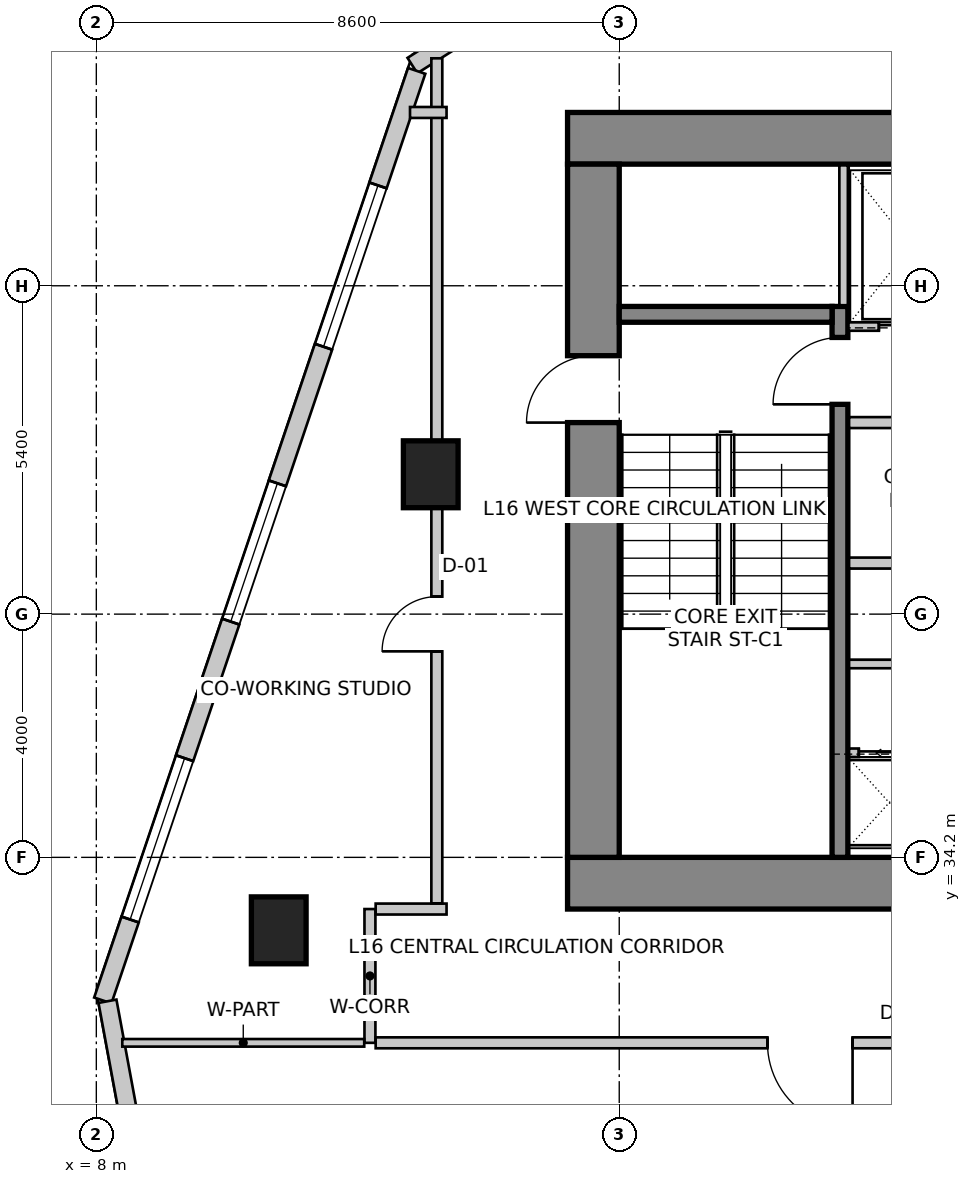
"""IFC4 building model, lengths in metres.
Left out: names, types, materials, properties, quantities, classifications, styles, units other than length and angle.
Written with IfcOpenShell. Run it as: python <this file> out.ifc"""

import sys

from ifc_helpers import new_model, si_unit, direction, frame, frame_2d, origin, origin_2d, place, context, subcontext, project, spatial, rectangle, extrude, source, transform, mapped, element, fill, save


model = new_model("IFC4")
c1 = context("Model", 3, precision=1e-05, world=origin(), true_north=direction((0.0, 1.0)))
c2 = subcontext(c1, "Body", "Model", "MODEL_VIEW")
j1 = project(units=[si_unit("LENGTHUNIT", "METRE"), si_unit("PLANEANGLEUNIT", "RADIAN")], contexts=[c1])
p1 = place(None, origin())
s1 = spatial("IfcSite", under=j1, at=p1, CompositionType="ELEMENT")
p2 = place(p1, origin())
s2 = spatial("IfcBuilding", under=s1, at=p2, CompositionType="ELEMENT")
p3 = place(p2, frame((0.0, 0.0, 67.0)))
s3 = spatial("IfcBuildingStorey", under=s2, at=p3, CompositionType="ELEMENT", Elevation=67.0)
p4 = place(p3, frame((15.75, 46.025, 0.0), z_axis=(0.0, 0.0, 1.0), x_axis=(1.0, 0.0, 0.0)))
e1 = element("IfcWall", 1, at=p4, inside=s3, PredefinedType="SHEAR", context=c2, shape_type="SweptSolid", body=[
    extrude(rectangle(XDim=16.1, YDim=0.85, at=frame_2d((8.05, 0.0))), origin(), (0.0, 0.0, 1.0), 4.0),
])
p5 = place(p3, frame((15.75, 33.775, 0.0), z_axis=(0.0, 0.0, 1.0), x_axis=(1.0, 0.0, 0.0)))
e2 = element("IfcWall", 2, at=p5, inside=s3, PredefinedType="SHEAR", context=c2, shape_type="SweptSolid", body=[
    extrude(rectangle(XDim=16.1, YDim=0.85, at=frame_2d((8.05, 0.0))), origin(), (0.0, 0.0, 1.0), 4.0),
])
m1 = source(origin(), c2, "Body", "SweptSolid", [
    extrude(rectangle(XDim=1.3, YDim=2.15, at=frame_2d((0.65, 1.075))), frame((0.0, 0.435, 0.0), z_axis=(0.0, -1.0, 0.0), x_axis=(1.0, 0.0, 0.0)), (0.0, 0.0, 1.0), 0.87),
])
p6 = place(p5, frame((10.18, 0.0, 0.0)))
e3 = element("IfcOpeningElement", 3, at=p6, cuts=e2, PredefinedType="OPENING", context=c2, shape_type="MappedRepresentation", body=[
    mapped(m1, transform((0.0, 0.0, 0.0), scale=1.0)),
])
p7 = place(p3, frame((16.175, 34.2, 0.0), z_axis=(0.0, 0.0, 1.0), x_axis=(0.0, 1.0, 0.0)))
e4 = element("IfcWall", 4, at=p7, inside=s3, PredefinedType="SHEAR", context=c2, shape_type="SweptSolid", body=[
    extrude(rectangle(XDim=11.4, YDim=0.85, at=frame_2d((5.7, 0.0))), origin(), (0.0, 0.0, 1.0), 4.0),
])
m2 = source(origin(), c2, "Body", "SweptSolid", [
    extrude(rectangle(XDim=1.1, YDim=2.15, at=frame_2d((0.55, 1.075))), frame((0.0, 0.435, 0.0), z_axis=(0.0, -1.0, 0.0), x_axis=(1.0, 0.0, 0.0)), (0.0, 0.0, 1.0), 0.87),
])
p8 = place(p7, frame((7.15, 0.0, 0.0)))
e5 = element("IfcOpeningElement", 5, at=p8, cuts=e4, PredefinedType="OPENING", context=c2, shape_type="MappedRepresentation", body=[
    mapped(m2, transform((0.0, 0.0, 0.0), scale=1.0)),
])
p9 = place(p3, frame((20.23, 34.2, 0.0), z_axis=(0.0, 0.0, 1.0), x_axis=(0.0, 1.0, 0.0)))
e6 = element("IfcWall", 6, at=p9, inside=s3, PredefinedType="SHEAR", context=c2, shape_type="SweptSolid", body=[
    extrude(rectangle(XDim=9.06, YDim=0.26, at=frame_2d((4.53, 0.0))), origin(), (0.0, 0.0, 1.0), 4.0),
])
m3 = source(origin(), c2, "Body", "SweptSolid", [
    extrude(rectangle(XDim=1.1, YDim=2.15, at=frame_2d((0.55, 1.075))), frame((0.0, 0.14, 0.0), z_axis=(0.0, -1.0, 0.0), x_axis=(1.0, 0.0, 0.0)), (0.0, 0.0, 1.0), 0.28),
])
p10 = place(p9, frame((7.45, 0.0, 0.0)))
e7 = element("IfcOpeningElement", 7, at=p10, cuts=e6, PredefinedType="OPENING", context=c2, shape_type="MappedRepresentation", body=[
    mapped(m3, transform((0.0, 0.0, 0.0), scale=1.0)),
])
p11 = place(p3, frame((16.6, 43.13, 0.0), z_axis=(0.0, 0.0, 1.0), x_axis=(1.0, 0.0, 0.0)))
e8 = element("IfcWall", 8, at=p11, inside=s3, PredefinedType="SHEAR", context=c2, shape_type="SweptSolid", body=[
    extrude(rectangle(XDim=3.5, YDim=0.26, at=frame_2d((1.75, 0.0))), origin(), (0.0, 0.0, 1.0), 4.0),
])
m4 = source(origin(), c2, "Body", "SweptSolid", [
    extrude(rectangle(XDim=0.9, YDim=1.1, at=origin_2d()), origin(), (0.0, 0.0, 1.0), 4.0),
])
for number, where, z_axis, x_axis in (
    (9, (11.0, 33.0, 0.0), (0.0, 0.0, 1.0), (1.0, 0.0, 0.0)),
    (10, (13.5, 40.5, 0.0), (0.0, 0.0, 1.0), (1.0, 0.0, 0.0)),
):
    element("IfcColumn", number, at=place(p3, frame(where, z_axis=z_axis, x_axis=x_axis)), inside=s3, PredefinedType="COLUMN", context=c2, shape_type="MappedRepresentation", body=[
        mapped(m4, transform((0.0, 0.0, 0.0), scale=1.0)),
    ])
p12 = place(p3, frame((21.875, 52.742, 0.0), z_axis=(0.0, 0.0, 1.0), x_axis=(-0.843662465249, -0.536873956092, 0.0)))
e11 = element("IfcWall", 11, at=p12, inside=s3, PredefinedType="SOLIDWALL", context=c2, shape_type="SweptSolid", body=[
    extrude(rectangle(XDim=10.284, YDim=0.3, at=frame_2d((5.142, 0.0))), origin(), (0.0, 0.0, 1.0), 3.75),
])
m5 = source(origin(), c2, "Body", "SweptSolid", [
    extrude(rectangle(XDim=0.9, YDim=1.6, at=frame_2d((0.45, 0.8))), frame((0.0, 0.16, 0.0), z_axis=(0.0, -1.0, 0.0), x_axis=(1.0, 0.0, 0.0)), (0.0, 0.0, 1.0), 0.32),
])
p13 = place(p12, frame((0.629, 0.0, 0.85)))
e12 = element("IfcOpeningElement", 12, at=p13, cuts=e11, PredefinedType="OPENING", context=c2, shape_type="MappedRepresentation", body=[
    mapped(m5, transform((0.0, 0.0, 0.0), scale=1.0)),
])
m6 = source(origin(), c2, "Body", "SweptSolid", [
    extrude(rectangle(XDim=2.4, YDim=2.2, at=frame_2d((1.2, 1.1))), frame((0.0, 0.16, 0.0), z_axis=(0.0, -1.0, 0.0), x_axis=(1.0, 0.0, 0.0)), (0.0, 0.0, 1.0), 0.32),
])
p14 = place(p12, frame((3.542, 0.0, 0.85)))
e13 = element("IfcOpeningElement", 13, at=p14, cuts=e11, PredefinedType="OPENING", context=c2, shape_type="MappedRepresentation", body=[
    mapped(m6, transform((0.0, 0.0, 0.0), scale=1.0)),
])
m7 = source(origin(), c2, "Body", "SweptSolid", [
    extrude(rectangle(XDim=1.5, YDim=1.8, at=frame_2d((0.75, 0.9))), frame((0.0, 0.16, 0.0), z_axis=(0.0, -1.0, 0.0), x_axis=(1.0, 0.0, 0.0)), (0.0, 0.0, 1.0), 0.32),
])
p15 = place(p12, frame((7.903, 0.0, 0.85)))
e14 = element("IfcOpeningElement", 14, at=p15, cuts=e11, PredefinedType="OPENING", context=c2, shape_type="MappedRepresentation", body=[
    mapped(m7, transform((0.0, 0.0, 0.0), scale=1.0)),
])
p16 = place(p3, frame((13.269, 47.134, 0.0), z_axis=(0.0, 0.0, 1.0), x_axis=(-0.319920423265, -0.947444416722, 0.0)))
e15 = element("IfcWall", 15, at=p16, inside=s3, PredefinedType="SOLIDWALL", context=c2, shape_type="SweptSolid", body=[
    extrude(rectangle(XDim=16.135, YDim=0.3, at=frame_2d((8.067, 0.0))), origin(), (0.0, 0.0, 1.0), 3.75),
])
m8 = source(origin(), c2, "Body", "SweptSolid", [
    extrude(rectangle(XDim=2.8, YDim=2.4, at=frame_2d((1.4, 1.2))), frame((0.0, 0.16, 0.0), z_axis=(0.0, -1.0, 0.0), x_axis=(1.0, 0.0, 0.0)), (0.0, 0.0, 1.0), 0.32),
])
p17 = place(p16, frame((1.988, 0.0, 0.85)))
e16 = element("IfcOpeningElement", 16, at=p17, cuts=e15, PredefinedType="OPENING", context=c2, shape_type="MappedRepresentation", body=[
    mapped(m8, transform((0.0, 0.0, 0.0), scale=1.0)),
])
p18 = place(p16, frame((7.159, 0.0, 0.85)))
e17 = element("IfcOpeningElement", 17, at=p18, cuts=e15, PredefinedType="OPENING", context=c2, shape_type="MappedRepresentation", body=[
    mapped(m6, transform((0.0, 0.0, 0.0), scale=1.0)),
])
p19 = place(p16, frame((11.93, 0.0, 0.85)))
e18 = element("IfcOpeningElement", 18, at=p19, cuts=e15, PredefinedType="OPENING", context=c2, shape_type="MappedRepresentation", body=[
    mapped(m8, transform((0.0, 0.0, 0.0), scale=1.0)),
])
p20 = place(p3, frame((8.183, 31.833, 0.0), z_axis=(0.0, 0.0, 1.0), x_axis=(0.18216364648, -0.983268226834, 0.0)))
e19 = element("IfcWall", 19, at=p20, inside=s3, PredefinedType="SOLIDWALL", context=c2, shape_type="SweptSolid", body=[
    extrude(rectangle(XDim=26.678, YDim=0.3, at=frame_2d((13.339, 0.0))), origin(), (0.0, 0.0, 1.0), 3.75),
])
m9 = source(origin(), c2, "Body", "SweptSolid", [
    extrude(rectangle(XDim=1.6, YDim=2.15, at=frame_2d((0.8, 1.075))), frame((0.0, 0.16, 0.0), z_axis=(0.0, -1.0, 0.0), x_axis=(1.0, 0.0, 0.0)), (0.0, 0.0, 1.0), 0.32),
])
p21 = place(p20, frame((9.427, 0.0, 0.0)))
e20 = element("IfcOpeningElement", 20, at=p21, cuts=e19, PredefinedType="OPENING", context=c2, shape_type="MappedRepresentation", body=[
    mapped(m9, transform((0.0, 0.0, 0.0), scale=1.0)),
])
p22 = place(p20, frame((3.842, 0.0, 0.85)))
e21 = element("IfcOpeningElement", 21, at=p22, cuts=e19, PredefinedType="OPENING", context=c2, shape_type="MappedRepresentation", body=[
    mapped(m6, transform((0.0, 0.0, 0.0), scale=1.0)),
])
p23 = place(p20, frame((13.847, 0.0, 0.85)))
e22 = element("IfcOpeningElement", 22, at=p23, cuts=e19, PredefinedType="OPENING", context=c2, shape_type="MappedRepresentation", body=[
    mapped(m6, transform((0.0, 0.0, 0.0), scale=1.0)),
])
p24 = place(p20, frame((18.172, 0.0, 0.85)))
e23 = element("IfcOpeningElement", 23, at=p24, cuts=e19, PredefinedType="OPENING", context=c2, shape_type="MappedRepresentation", body=[
    mapped(m8, transform((0.0, 0.0, 0.0), scale=1.0)),
])
p25 = place(p20, frame((22.896, 0.0, 0.85)))
e24 = element("IfcOpeningElement", 24, at=p25, cuts=e19, PredefinedType="OPENING", context=c2, shape_type="MappedRepresentation", body=[
    mapped(m6, transform((0.0, 0.0, 0.0), scale=1.0)),
])
p26 = place(p3, frame((20.37, 42.93, 0.0), z_axis=(0.0, 0.0, 1.0), x_axis=(1.0, 0.0, 0.0)))
e25 = element("IfcWall", 25, at=p26, inside=s3, PredefinedType="SOLIDWALL", context=c2, shape_type="SweptSolid", body=[
    extrude(rectangle(XDim=6.86, YDim=0.14, at=frame_2d((3.43, 0.0))), origin(), (0.0, 0.0, 1.0), 3.75),
])
m10 = source(origin(), c2, "Body", "SweptSolid", [
    extrude(rectangle(XDim=1.1, YDim=2.15, at=frame_2d((0.55, 1.075))), frame((0.0, 0.08, 0.0), z_axis=(0.0, -1.0, 0.0), x_axis=(1.0, 0.0, 0.0)), (0.0, 0.0, 1.0), 0.16),
])
p27 = place(p26, frame((0.5, 0.0, 0.0)))
e26 = element("IfcOpeningElement", 26, at=p27, cuts=e25, PredefinedType="OPENING", context=c2, shape_type="MappedRepresentation", body=[
    mapped(m10, transform((0.0, 0.0, 0.0), scale=1.0)),
])
p28 = place(p26, frame((2.7, 0.0, 0.0)))
e27 = element("IfcOpeningElement", 27, at=p28, cuts=e25, PredefinedType="OPENING", context=c2, shape_type="MappedRepresentation", body=[
    mapped(m10, transform((0.0, 0.0, 0.0), scale=1.0)),
])
p29 = place(p26, frame((5.1, 0.0, 0.0)))
e28 = element("IfcOpeningElement", 28, at=p29, cuts=e25, PredefinedType="OPENING", context=c2, shape_type="MappedRepresentation", body=[
    mapped(m10, transform((0.0, 0.0, 0.0), scale=1.0)),
])
p30 = place(p3, frame((20.29, 43.28, 0.0), z_axis=(0.0, 0.0, 1.0), x_axis=(0.0, 1.0, 0.0)))
e29 = element("IfcWall", 29, at=p30, inside=s3, PredefinedType="SOLIDWALL", context=c2, shape_type="SweptSolid", body=[
    extrude(rectangle(XDim=2.3, YDim=0.14, at=frame_2d((1.15, 0.0))), origin(), (0.0, 0.0, 1.0), 3.75),
])
p31 = place(p3, frame((20.38, 35.92, 0.0), z_axis=(0.0, 0.0, 1.0), x_axis=(1.0, 0.0, 0.0)))
e30 = element("IfcWall", 30, at=p31, inside=s3, PredefinedType="SOLIDWALL", context=c2, shape_type="SweptSolid", body=[
    extrude(rectangle(XDim=5.65, YDim=0.14, at=frame_2d((2.825, 0.0))), origin(), (0.0, 0.0, 1.0), 3.75),
])
m11 = source(origin(), c2, "Body", "SweptSolid", [
    extrude(rectangle(XDim=1.0, YDim=2.15, at=frame_2d((0.5, 1.075))), frame((0.0, 0.08, 0.0), z_axis=(0.0, -1.0, 0.0), x_axis=(1.0, 0.0, 0.0)), (0.0, 0.0, 1.0), 0.16),
])
p32 = place(p31, frame((0.16, 0.0, 0.0)))
e31 = element("IfcOpeningElement", 31, at=p32, cuts=e30, PredefinedType="OPENING", context=c2, shape_type="MappedRepresentation", body=[
    mapped(m11, transform((0.0, 0.0, 0.0), scale=1.0)),
])
p33 = place(p31, frame((1.55, 0.0, 0.0)))
e32 = element("IfcOpeningElement", 32, at=p33, cuts=e30, PredefinedType="OPENING", context=c2, shape_type="MappedRepresentation", body=[
    mapped(m11, transform((0.0, 0.0, 0.0), scale=1.0)),
])
p34 = place(p3, frame((20.38, 37.38, 0.0), z_axis=(0.0, 0.0, 1.0), x_axis=(1.0, 0.0, 0.0)))
e33 = element("IfcWall", 33, at=p34, inside=s3, PredefinedType="SOLIDWALL", context=c2, shape_type="SweptSolid", body=[
    extrude(rectangle(XDim=5.75, YDim=0.14, at=frame_2d((2.875, 0.0))), origin(), (0.0, 0.0, 1.0), 3.75),
])
p35 = place(p3, frame((20.38, 39.04, 0.0), z_axis=(0.0, 0.0, 1.0), x_axis=(1.0, 0.0, 0.0)))
e34 = element("IfcWall", 34, at=p35, inside=s3, PredefinedType="SOLIDWALL", context=c2, shape_type="SweptSolid", body=[
    extrude(rectangle(XDim=5.75, YDim=0.18, at=frame_2d((2.875, 0.0))), origin(), (0.0, 0.0, 1.0), 3.75),
])
p36 = place(p3, frame((24.81, 41.35, 0.0), z_axis=(0.0, 0.0, 1.0), x_axis=(-1.0, 0.0, 0.0)))
e35 = element("IfcWall", 35, at=p36, inside=s3, PredefinedType="PARTITIONING", context=c2, shape_type="SweptSolid", body=[
    extrude(rectangle(XDim=4.43, YDim=0.18, at=frame_2d((2.215, 0.0))), origin(), (0.0, 0.0, 1.0), 3.75),
])
p37 = place(p3, frame((12.5, 31.15, 0.0), z_axis=(0.0, 0.0, 1.0), x_axis=(0.0, 1.0, 0.0)))
e36 = element("IfcWall", 36, at=p37, inside=s3, PredefinedType="PARTITIONING", context=c2, shape_type="SweptSolid", body=[
    extrude(rectangle(XDim=2.2, YDim=0.18, at=frame_2d((1.1, 0.0))), origin(), (0.0, 0.0, 1.0), 3.419),
])
p38 = place(p3, frame((12.594, 33.35, 0.0), z_axis=(0.0, 0.0, 1.0), x_axis=(1.0, 0.0, 0.0)))
e37 = element("IfcWall", 37, at=p38, inside=s3, PredefinedType="PARTITIONING", context=c2, shape_type="SweptSolid", body=[
    extrude(rectangle(XDim=1.166, YDim=0.18, at=frame_2d((0.583, 0.0))), origin(), (0.0, 0.0, 1.0), 3.75),
])
p39 = place(p3, frame((26.76, 31.15, 0.0), z_axis=(0.0, 0.0, 1.0), x_axis=(-1.0, 0.0, 0.0)))
e38 = element("IfcWall", 38, at=p39, inside=s3, PredefinedType="PARTITIONING", context=c2, shape_type="SweptSolid", body=[
    extrude(rectangle(XDim=14.166, YDim=0.18, at=frame_2d((7.083, 0.0))), origin(), (0.0, 0.0, 1.0), 3.419),
])
m12 = source(origin(), c2, "Body", "SweptSolid", [
    extrude(rectangle(XDim=1.4, YDim=2.15, at=frame_2d((0.7, 1.075))), frame((0.0, 0.1, 0.0), z_axis=(0.0, -1.0, 0.0), x_axis=(1.0, 0.0, 0.0)), (0.0, 0.0, 1.0), 0.2),
])
p40 = place(p39, frame((6.323, 0.0, 0.0)))
e39 = element("IfcOpeningElement", 39, at=p40, cuts=e38, PredefinedType="OPENING", context=c2, shape_type="MappedRepresentation", body=[
    mapped(m12, transform((0.0, 0.0, 0.0), scale=1.0)),
])
p41 = place(p3, frame((13.6, 33.444, 0.0), z_axis=(0.0, 0.0, 1.0), x_axis=(0.0, 1.0, 0.0)))
e40 = element("IfcWall", 40, at=p41, inside=s3, PredefinedType="PARTITIONING", context=c2, shape_type="SweptSolid", body=[
    extrude(rectangle(XDim=13.896, YDim=0.18, at=frame_2d((6.948, 0.0))), origin(), (0.0, 0.0, 1.0), 2.892),
])
m13 = source(origin(), c2, "Body", "SweptSolid", [
    extrude(rectangle(XDim=0.9, YDim=2.15, at=frame_2d((0.45, 1.075))), frame((0.0, 0.1, 0.0), z_axis=(0.0, -1.0, 0.0), x_axis=(1.0, 0.0, 0.0)), (0.0, 0.0, 1.0), 0.2),
])
p42 = place(p41, frame((4.144, 0.0, 0.0)))
e41 = element("IfcOpeningElement", 41, at=p42, cuts=e40, PredefinedType="OPENING", context=c2, shape_type="MappedRepresentation", body=[
    mapped(m13, transform((0.0, 0.0, 0.0), scale=1.0)),
])
p43 = place(p3, frame((13.76, 46.45, 0.0), z_axis=(0.0, 0.0, 1.0), x_axis=(-1.0, 0.0, 0.0)))
e42 = element("IfcWall", 42, at=p43, inside=s3, PredefinedType="PARTITIONING", context=c2, shape_type="SweptSolid", body=[
    extrude(rectangle(XDim=0.601, YDim=0.18, at=frame_2d((0.301, 0.0))), origin(), (0.0, 0.0, 1.0), 3.75),
])
p44 = place(p3, frame((12.406, 31.15, 0.0), z_axis=(0.0, 0.0, 1.0), x_axis=(-1.0, 0.0, 0.0)))
e43 = element("IfcWall", 43, at=p44, inside=s3, PredefinedType="PARTITIONING", context=c2, shape_type="SweptSolid", body=[
    extrude(rectangle(XDim=3.979, YDim=0.125, at=frame_2d((1.99, 0.0))), origin(), (0.0, 0.0, 1.0), 2.892),
])
m14 = source(origin(), c2, "Body", "SweptSolid", [
    extrude(rectangle(XDim=2.8, YDim=2.4, at=frame_2d((1.4, 1.2))), frame((0.0, -0.015, 0.0), z_axis=(0.0, -1.0, 0.0), x_axis=(1.0, 0.0, 0.0)), (0.0, 0.0, 1.0), 0.06),
])
p45 = place(p17, origin())
e44 = element("IfcWindow", 44, at=p45, inside=s3, PartitioningType="SINGLE_PANEL", PredefinedType="WINDOW", context=c2, shape_type="MappedRepresentation", body=[
    mapped(m14, transform((0.0, 0.0, 0.0), scale=1.0)),
])
fill(e16, e44)
m15 = source(origin(), c2, "Body", "SweptSolid", [
    extrude(rectangle(XDim=2.4, YDim=2.2, at=frame_2d((1.2, 1.1))), frame((0.0, -0.015, 0.0), z_axis=(0.0, -1.0, 0.0), x_axis=(1.0, 0.0, 0.0)), (0.0, 0.0, 1.0), 0.06),
])
p46 = place(p18, origin())
e45 = element("IfcWindow", 45, at=p46, inside=s3, PartitioningType="SINGLE_PANEL", PredefinedType="WINDOW", context=c2, shape_type="MappedRepresentation", body=[
    mapped(m15, transform((0.0, 0.0, 0.0), scale=1.0)),
])
fill(e17, e45)
p47 = place(p19, origin())
e46 = element("IfcWindow", 46, at=p47, inside=s3, PartitioningType="SINGLE_PANEL", PredefinedType="WINDOW", context=c2, shape_type="MappedRepresentation", body=[
    mapped(m14, transform((0.0, 0.0, 0.0), scale=1.0)),
])
fill(e18, e46)
m16 = source(origin(), c2, "Body", "SweptSolid", [
    extrude(rectangle(XDim=1.1, YDim=2.15, at=frame_2d((0.55, 1.075))), frame((0.0, 0.025, 0.0), z_axis=(0.0, -1.0, 0.0), x_axis=(1.0, 0.0, 0.0)), (0.0, 0.0, 1.0), 0.05),
])
p48 = place(p27, origin())
e47 = element("IfcDoor", 47, at=p48, inside=s3, OperationType="SLIDING_TO_LEFT", PredefinedType="DOOR", context=c2, shape_type="MappedRepresentation", body=[
    mapped(m16, transform((0.0, 0.0, 0.0), scale=1.0)),
])
fill(e26, e47)
m17 = source(origin(), c2, "Body", "SweptSolid", [
    extrude(rectangle(XDim=1.0, YDim=2.15, at=frame_2d((0.5, 1.075))), frame((0.0, 0.025, 0.0), z_axis=(0.0, -1.0, 0.0), x_axis=(1.0, 0.0, 0.0)), (0.0, 0.0, 1.0), 0.05),
])
p49 = place(p32, origin())
e48 = element("IfcDoor", 48, at=p49, inside=s3, OperationType="SLIDING_TO_LEFT", PredefinedType="DOOR", context=c2, shape_type="MappedRepresentation", body=[
    mapped(m17, transform((0.0, 0.0, 0.0), scale=1.0)),
])
fill(e31, e48)
m18 = source(origin(), c2, "Body", "SweptSolid", [
    extrude(rectangle(XDim=1.1, YDim=2.15, at=frame_2d((0.55, 1.075))), frame((0.0, 0.025, 0.0), z_axis=(0.0, -1.0, 0.0), x_axis=(1.0, 0.0, 0.0)), (0.0, 0.0, 1.0), 0.05),
])
p50 = place(p10, origin())
e49 = element("IfcDoor", 49, at=p50, inside=s3, OperationType="SINGLE_SWING_LEFT", PredefinedType="DOOR", context=c2, shape_type="MappedRepresentation", body=[
    mapped(m18, transform((0.0, 0.0, 0.0), scale=1.0)),
])
fill(e7, e49)
p51 = place(p8, origin())
e50 = element("IfcDoor", 50, at=p51, inside=s3, OperationType="SINGLE_SWING_LEFT", PredefinedType="DOOR", context=c2, shape_type="MappedRepresentation", body=[
    mapped(m18, transform((0.0, 0.0, 0.0), scale=1.0)),
])
fill(e5, e50)
m19 = source(origin(), c2, "Body", "SweptSolid", [
    extrude(rectangle(XDim=0.9, YDim=2.15, at=frame_2d((0.45, 1.075))), frame((0.0, 0.025, 0.0), z_axis=(0.0, -1.0, 0.0), x_axis=(1.0, 0.0, 0.0)), (0.0, 0.0, 1.0), 0.05),
])
p52 = place(p42, origin())
e51 = element("IfcDoor", 51, at=p52, inside=s3, OperationType="SINGLE_SWING_LEFT", PredefinedType="DOOR", context=c2, shape_type="MappedRepresentation", body=[
    mapped(m19, transform((0.0, 0.0, 0.0), scale=1.0)),
])
fill(e41, e51)
m20 = source(origin(), c2, "Body", "SweptSolid", [
    extrude(rectangle(XDim=1.4, YDim=2.15, at=frame_2d((0.7, 1.075))), frame((0.0, 0.025, 0.0), z_axis=(0.0, -1.0, 0.0), x_axis=(1.0, 0.0, 0.0)), (0.0, 0.0, 1.0), 0.05),
])
p53 = place(p40, origin())
e52 = element("IfcDoor", 52, at=p53, inside=s3, OperationType="SINGLE_SWING_LEFT", PredefinedType="DOOR", context=c2, shape_type="MappedRepresentation", body=[
    mapped(m20, transform((0.0, 0.0, 0.0), scale=1.0)),
])
fill(e39, e52)
save(model, sys.argv[1])
